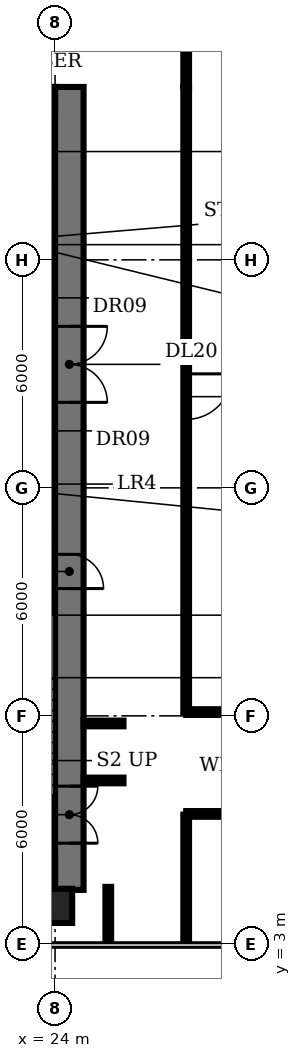
"""IFC4 building model, lengths in metres.
Left out: names, types, materials, properties, quantities, classifications, styles, units other than length and angle.
Written with IfcOpenShell. Run it as: python <this file> out.ifc"""

import sys

from ifc_helpers import new_model, si_unit, direction, frame, frame_2d, origin, origin_2d, place, context, subcontext, project, spatial, rectangle, extrude, element, fill, save


model = new_model("IFC4")
c1 = context("Model", 3, precision=1e-05, world=origin(), true_north=direction((0.0, 1.0)))
c2 = subcontext(c1, "Body", "Model", "MODEL_VIEW")
j1 = project(units=[si_unit("LENGTHUNIT", "METRE"), si_unit("PLANEANGLEUNIT", "RADIAN")], contexts=[c1])
p1 = place(None, origin())
s1 = spatial("IfcSite", under=j1, at=p1, CompositionType="ELEMENT")
p2 = place(p1, origin())
s2 = spatial("IfcBuilding", under=s1, at=p2, CompositionType="ELEMENT")
p3 = place(p2, frame((0.0, 0.0, 96.2)))
s3 = spatial("IfcBuildingStorey", under=s2, at=p3, CompositionType="ELEMENT", Elevation=96.2)
p4 = place(p3, frame((24.0, 4.0, 0.0), z_axis=(0.0, 0.0, 1.0), x_axis=(1.0, 0.0, 0.0)))
e1 = element("IfcColumn", 1, at=p4, inside=s3, PredefinedType="COLUMN", context=c2, shape_type="SweptSolid", body=[
    extrude(rectangle(XDim=0.9, YDim=0.9, at=origin_2d()), origin(), (0.0, 0.0, 1.0), 3.85),
])
p5 = place(p3, frame((20.85, 11.825, 0.0), z_axis=(0.0, 0.0, 1.0), x_axis=(1.0, 0.0, 0.0)))
e2 = element("IfcWall", 2, at=p5, inside=s3, PredefinedType="SHEAR", context=c2, shape_type="SweptSolid", body=[
    extrude(rectangle(XDim=3.15, YDim=0.25, at=frame_2d((1.575, 0.0))), origin(), (0.0, 0.0, 1.0), 3.85),
])
p6 = place(p3, frame((16.6, 13.7, 0.0), z_axis=(0.0, 0.0, 1.0), x_axis=(1.0, 0.0, 0.0)))
e3 = element("IfcWall", 3, at=p6, inside=s3, PredefinedType="PARTITIONING", context=c2, shape_type="SweptSolid", body=[
    extrude(rectangle(XDim=7.4, YDim=0.225, at=frame_2d((3.7, 0.0))), origin(), (0.0, 0.0, 1.0), 3.85),
])
p7 = place(p3, frame((9.4, 16.5, 0.0), z_axis=(0.0, 0.0, 1.0), x_axis=(1.0, 0.0, 0.0)))
e4 = element("IfcWall", 4, at=p7, inside=s3, PredefinedType="PARTITIONING", context=c2, shape_type="SweptSolid", body=[
    extrude(rectangle(XDim=14.6, YDim=0.225, at=frame_2d((7.3, 0.0))), origin(), (0.0, 0.0, 1.0), 3.85),
])
p8 = place(p7, frame((0.75, 0.0, 0.0)))
e5 = element("IfcOpeningElement", 5, at=p8, cuts=e4, PredefinedType="OPENING", context=c2, shape_type="SweptSolid", body=[
    extrude(rectangle(XDim=1.1, YDim=2.1, at=frame_2d((0.55, 1.05))), frame((0.0, 0.123, 0.0), z_axis=(0.0, -1.0, 0.0), x_axis=(1.0, 0.0, 0.0)), (0.0, 0.0, 1.0), 0.245),
])
p9 = place(p7, frame((3.55, 0.0, 0.0)))
e6 = element("IfcOpeningElement", 6, at=p9, cuts=e4, PredefinedType="OPENING", context=c2, shape_type="SweptSolid", body=[
    extrude(rectangle(XDim=1.1, YDim=2.1, at=frame_2d((0.55, 1.05))), frame((0.0, 0.123, 0.0), z_axis=(0.0, -1.0, 0.0), x_axis=(1.0, 0.0, 0.0)), (0.0, 0.0, 1.0), 0.245),
])
p10 = place(p7, frame((6.35, 0.0, 0.0)))
e7 = element("IfcOpeningElement", 7, at=p10, cuts=e4, PredefinedType="OPENING", context=c2, shape_type="SweptSolid", body=[
    extrude(rectangle(XDim=1.1, YDim=2.1, at=frame_2d((0.55, 1.05))), frame((0.0, 0.123, 0.0), z_axis=(0.0, -1.0, 0.0), x_axis=(1.0, 0.0, 0.0)), (0.0, 0.0, 1.0), 0.245),
])
p11 = place(p7, frame((9.15, 0.0, 0.0)))
e8 = element("IfcOpeningElement", 8, at=p11, cuts=e4, PredefinedType="OPENING", context=c2, shape_type="SweptSolid", body=[
    extrude(rectangle(XDim=1.1, YDim=2.1, at=frame_2d((0.55, 1.05))), frame((0.0, 0.123, 0.0), z_axis=(0.0, -1.0, 0.0), x_axis=(1.0, 0.0, 0.0)), (0.0, 0.0, 1.0), 0.245),
])
p12 = place(p7, frame((11.647, 0.0, 0.0)))
e9 = element("IfcOpeningElement", 9, at=p12, cuts=e4, PredefinedType="OPENING", context=c2, shape_type="SweptSolid", body=[
    extrude(rectangle(XDim=0.9, YDim=2.1, at=frame_2d((0.45, 1.05))), frame((0.0, 0.123, 0.0), z_axis=(0.0, -1.0, 0.0), x_axis=(1.0, 0.0, 0.0)), (0.0, 0.0, 1.0), 0.245),
])
p13 = place(p7, frame((13.423, 0.0, 0.0)))
e10 = element("IfcOpeningElement", 10, at=p13, cuts=e4, PredefinedType="OPENING", context=c2, shape_type="SweptSolid", body=[
    extrude(rectangle(XDim=0.9, YDim=2.1, at=frame_2d((0.45, 1.05))), frame((0.0, 0.123, 0.0), z_axis=(0.0, -1.0, 0.0), x_axis=(1.0, 0.0, 0.0)), (0.0, 0.0, 1.0), 0.245),
])
p14 = place(p3, frame((24.0, 20.0, 0.0), z_axis=(0.0, 0.0, 1.0), x_axis=(-1.0, 0.0, 0.0)))
e11 = element("IfcWall", 11, at=p14, inside=s3, PredefinedType="PARTITIONING", context=c2, shape_type="SweptSolid", body=[
    extrude(rectangle(XDim=14.6, YDim=0.225, at=frame_2d((7.3, 0.0))), origin(), (0.0, 0.0, 1.0), 3.85),
])
p15 = place(p14, frame((12.5, 0.0, 0.0)))
e12 = element("IfcOpeningElement", 12, at=p15, cuts=e11, PredefinedType="OPENING", context=c2, shape_type="SweptSolid", body=[
    extrude(rectangle(XDim=1.0, YDim=2.1, at=frame_2d((0.5, 1.05))), frame((0.0, 0.123, 0.0), z_axis=(0.0, -1.0, 0.0), x_axis=(1.0, 0.0, 0.0)), (0.0, 0.0, 1.0), 0.245),
])
p16 = place(p14, frame((8.825, 0.0, 0.0)))
e13 = element("IfcOpeningElement", 13, at=p16, cuts=e11, PredefinedType="OPENING", context=c2, shape_type="SweptSolid", body=[
    extrude(rectangle(XDim=1.0, YDim=2.1, at=frame_2d((0.5, 1.05))), frame((0.0, 0.123, 0.0), z_axis=(0.0, -1.0, 0.0), x_axis=(1.0, 0.0, 0.0)), (0.0, 0.0, 1.0), 0.245),
])
p17 = place(p14, frame((4.925, 0.0, 0.0)))
e14 = element("IfcOpeningElement", 14, at=p17, cuts=e11, PredefinedType="OPENING", context=c2, shape_type="SweptSolid", body=[
    extrude(rectangle(XDim=1.0, YDim=2.1, at=frame_2d((0.5, 1.05))), frame((0.0, 0.123, 0.0), z_axis=(0.0, -1.0, 0.0), x_axis=(1.0, 0.0, 0.0)), (0.0, 0.0, 1.0), 0.245),
])
p18 = place(p14, frame((2.137, 0.0, 0.0)))
e15 = element("IfcOpeningElement", 15, at=p18, cuts=e11, PredefinedType="OPENING", context=c2, shape_type="SweptSolid", body=[
    extrude(rectangle(XDim=0.9, YDim=2.1, at=frame_2d((0.45, 1.05))), frame((0.0, 0.123, 0.0), z_axis=(0.0, -1.0, 0.0), x_axis=(1.0, 0.0, 0.0)), (0.0, 0.0, 1.0), 0.245),
])
p19 = place(p14, frame((0.363, 0.0, 0.0)))
e16 = element("IfcOpeningElement", 16, at=p19, cuts=e11, PredefinedType="OPENING", context=c2, shape_type="SweptSolid", body=[
    extrude(rectangle(XDim=0.9, YDim=2.1, at=frame_2d((0.45, 1.05))), frame((0.0, 0.123, 0.0), z_axis=(0.0, -1.0, 0.0), x_axis=(1.0, 0.0, 0.0)), (0.0, 0.0, 1.0), 0.245),
])
p20 = place(p3, frame((9.4, 22.8, 0.0), z_axis=(0.0, 0.0, 1.0), x_axis=(1.0, 0.0, 0.0)))
e17 = element("IfcWall", 17, at=p20, inside=s3, PredefinedType="PARTITIONING", context=c2, shape_type="SweptSolid", body=[
    extrude(rectangle(XDim=14.6, YDim=0.225, at=frame_2d((7.3, 0.0))), origin(), (0.0, 0.0, 1.0), 3.85),
])
p21 = place(p3, frame((24.375, 25.55, 0.0), z_axis=(0.0, 0.0, 1.0), x_axis=(0.0, -1.0, 0.0)))
e18 = element("IfcWall", 18, at=p21, inside=s3, PredefinedType="SHEAR", context=c2, shape_type="SweptSolid", body=[
    extrude(rectangle(XDim=21.13, YDim=0.75, at=frame_2d((10.565, 0.0))), origin(), (0.0, 0.0, 1.0), 3.85),
])
p22 = place(p21, frame((18.4, 0.0, 0.0)))
e19 = element("IfcOpeningElement", 19, at=p22, cuts=e18, PredefinedType="OPENING", context=c2, shape_type="SweptSolid", body=[
    extrude(rectangle(XDim=1.5, YDim=2.1, at=frame_2d((0.75, 1.05))), frame((0.0, 0.385, 0.0), z_axis=(0.0, -1.0, 0.0), x_axis=(1.0, 0.0, 0.0)), (0.0, 0.0, 1.0), 0.77),
])
p23 = place(p21, frame((12.3, 0.0, 0.0)))
e20 = element("IfcOpeningElement", 20, at=p23, cuts=e18, PredefinedType="OPENING", context=c2, shape_type="SweptSolid", body=[
    extrude(rectangle(XDim=0.9, YDim=2.1, at=frame_2d((0.45, 1.05))), frame((0.0, 0.385, 0.0), z_axis=(0.0, -1.0, 0.0), x_axis=(1.0, 0.0, 0.0)), (0.0, 0.0, 1.0), 0.77),
])
p24 = place(p21, frame((6.3, 0.0, 0.0)))
e21 = element("IfcOpeningElement", 21, at=p24, cuts=e18, PredefinedType="OPENING", context=c2, shape_type="SweptSolid", body=[
    extrude(rectangle(XDim=2.0, YDim=2.1, at=frame_2d((1.0, 1.05))), frame((0.0, 0.385, 0.0), z_axis=(0.0, -1.0, 0.0), x_axis=(1.0, 0.0, 0.0)), (0.0, 0.0, 1.0), 0.77),
])
p25 = place(p3, frame((24.0, 5.025, 0.0), z_axis=(0.0, 0.0, 1.0), x_axis=(-1.0, 0.0, 0.0)))
e22 = element("IfcWall", 22, at=p25, inside=s3, PredefinedType="SHEAR", context=c2, shape_type="SweptSolid", body=[
    extrude(rectangle(XDim=18.0, YDim=0.75, at=frame_2d((9.0, 0.0))), origin(), (0.0, 0.0, 1.0), 3.85),
])
p26 = place(p25, frame((0.825, 0.0, 0.0)))
e23 = element("IfcOpeningElement", 23, at=p26, cuts=e22, PredefinedType="OPENING", context=c2, shape_type="SweptSolid", body=[
    extrude(rectangle(XDim=1.5, YDim=2.1, at=frame_2d((0.75, 1.05))), frame((0.0, 0.385, 0.0), z_axis=(0.0, -1.0, 0.0), x_axis=(1.0, 0.0, 0.0)), (0.0, 0.0, 1.0), 0.77),
])
p27 = place(p25, frame((15.675, 0.0, 0.0)))
e24 = element("IfcOpeningElement", 24, at=p27, cuts=e22, PredefinedType="OPENING", context=c2, shape_type="SweptSolid", body=[
    extrude(rectangle(XDim=1.5, YDim=2.1, at=frame_2d((0.75, 1.05))), frame((0.0, 0.385, 0.0), z_axis=(0.0, -1.0, 0.0), x_axis=(1.0, 0.0, 0.0)), (0.0, 0.0, 1.0), 0.77),
])
p28 = place(p25, frame((13.0, 0.0, 0.0)))
e25 = element("IfcOpeningElement", 25, at=p28, cuts=e22, PredefinedType="OPENING", context=c2, shape_type="SweptSolid", body=[
    extrude(rectangle(XDim=1.2, YDim=2.1, at=frame_2d((0.6, 1.05))), frame((0.0, 0.385, 0.0), z_axis=(0.0, -1.0, 0.0), x_axis=(1.0, 0.0, 0.0)), (0.0, 0.0, 1.0), 0.77),
])
p29 = place(p25, frame((4.35, 0.0, 0.0)))
e26 = element("IfcOpeningElement", 26, at=p29, cuts=e22, PredefinedType="OPENING", context=c2, shape_type="SweptSolid", body=[
    extrude(rectangle(XDim=1.0, YDim=2.1, at=frame_2d((0.5, 1.05))), frame((0.0, 0.385, 0.0), z_axis=(0.0, -1.0, 0.0), x_axis=(1.0, 0.0, 0.0)), (0.0, 0.0, 1.0), 0.77),
])
p30 = place(p3, frame((6.0, 25.175, 0.0), z_axis=(0.0, 0.0, 1.0), x_axis=(1.0, 0.0, 0.0)))
e27 = element("IfcWall", 27, at=p30, inside=s3, PredefinedType="SHEAR", context=c2, shape_type="SweptSolid", body=[
    extrude(rectangle(XDim=18.0, YDim=0.75, at=frame_2d((9.0, 0.0))), origin(), (0.0, 0.0, 1.0), 3.85),
])
for number, where, z_axis, x_axis in (
    (28, (24.75, 7.3, 0.0), (0.0, 0.0, 1.0), (1.0, 0.0, 0.0)),
    (29, (24.75, 8.8, 0.0), (0.0, 0.0, 1.0), (1.0, 0.0, 0.0)),
):
    element("IfcWall", number, at=place(p3, frame(where, z_axis=z_axis, x_axis=x_axis)), inside=s3, PredefinedType="PARTITIONING", context=c2, shape_type="SweptSolid", body=[
        extrude(rectangle(XDim=1.05, YDim=0.15, at=frame_2d((0.525, 0.0))), origin(), (0.0, 0.0, 1.0), 2.83),
    ])
p31 = place(p3, frame((25.4, 3.02, 0.0), z_axis=(0.0, 0.0, 1.0), x_axis=(0.0, 1.0, 0.0)))
e30 = element("IfcWall", 30, at=p31, inside=s3, PredefinedType="PARTITIONING", context=c2, shape_type="SweptSolid", body=[
    extrude(rectangle(XDim=1.48, YDim=0.15, at=frame_2d((0.74, 0.0))), origin(), (0.0, 0.0, 1.0), 2.83),
])
p32 = place(p3, frame((27.45, 3.02, 0.0), z_axis=(0.0, 0.0, 1.0), x_axis=(0.0, 1.0, 0.0)))
e31 = element("IfcWall", 31, at=p32, inside=s3, PredefinedType="PARTITIONING", context=c2, shape_type="SweptSolid", body=[
    extrude(rectangle(XDim=3.38, YDim=0.15, at=frame_2d((1.69, 0.0))), origin(), (0.0, 0.0, 1.0), 2.83),
])
p33 = place(p3, frame((27.45, 9.1, 0.0), z_axis=(0.0, 0.0, 1.0), x_axis=(1.0, 0.0, 0.0)))
e32 = element("IfcWall", 32, at=p33, inside=s3, PredefinedType="PARTITIONING", context=c2, shape_type="SweptSolid", body=[
    extrude(rectangle(XDim=8.55, YDim=0.15, at=frame_2d((4.275, 0.0))), origin(), (0.0, 0.0, 1.0), 2.83),
])
p34 = place(p3, frame((27.45, 25.55, 0.0), z_axis=(0.0, 0.0, 1.0), x_axis=(0.0, -1.0, 0.0)))
e33 = element("IfcWall", 33, at=p34, inside=s3, PredefinedType="PARTITIONING", context=c2, shape_type="SweptSolid", body=[
    extrude(rectangle(XDim=16.45, YDim=0.15, at=frame_2d((8.225, 0.0))), origin(), (0.0, 0.0, 1.0), 2.83),
])
p35 = place(p34, frame((7.55, 0.0, 0.0)))
e34 = element("IfcOpeningElement", 34, at=p35, cuts=e33, PredefinedType="OPENING", context=c2, shape_type="SweptSolid", body=[
    extrude(rectangle(XDim=1.2, YDim=2.1, at=frame_2d((0.6, 1.05))), frame((0.0, 0.085, 0.0), z_axis=(0.0, -1.0, 0.0), x_axis=(1.0, 0.0, 0.0)), (0.0, 0.0, 1.0), 0.17),
])
p36 = place(p3, frame((27.45, 25.55, 0.0), z_axis=(0.0, 0.0, 1.0), x_axis=(0.0, 1.0, 0.0)))
e35 = element("IfcWall", 35, at=p36, inside=s3, PredefinedType="PARTITIONING", context=c2, shape_type="SweptSolid", body=[
    extrude(rectangle(XDim=3.9, YDim=0.15, at=frame_2d((1.95, 0.0))), origin(), (0.0, 0.0, 1.0), 2.83),
])
p37 = place(p3, frame((51.78, 6.419, 0.0), z_axis=(0.0, 0.0, 1.0), x_axis=(-1.0, 0.0, 0.0)))
e36 = element("IfcWall", 36, at=p37, inside=s3, PredefinedType="PARTITIONING", context=c2, shape_type="SweptSolid", body=[
    extrude(rectangle(XDim=24.33, YDim=0.15, at=frame_2d((12.165, 0.0))), origin(), (0.0, 0.0, 1.0), 2.83),
])
p38 = place(p37, frame((11.53, 0.0, 0.0)))
e37 = element("IfcOpeningElement", 37, at=p38, cuts=e36, PredefinedType="OPENING", context=c2, shape_type="SweptSolid", body=[
    extrude(rectangle(XDim=1.2, YDim=2.1, at=frame_2d((0.6, 1.05))), frame((0.0, 0.085, 0.0), z_axis=(0.0, -1.0, 0.0), x_axis=(1.0, 0.0, 0.0)), (0.0, 0.0, 1.0), 0.17),
])
p39 = place(p22, origin())
e38 = element("IfcDoor", 38, at=p39, inside=s3, OperationType="DOUBLE_DOOR_SINGLE_SWING", PredefinedType="DOOR", context=c2, shape_type="SweptSolid", body=[
    extrude(rectangle(XDim=1.5, YDim=2.1, at=frame_2d((0.75, 1.05))), frame((0.0, 0.025, 0.0), z_axis=(0.0, -1.0, 0.0), x_axis=(1.0, 0.0, 0.0)), (0.0, 0.0, 1.0), 0.05),
])
fill(e19, e38)
p40 = place(p23, origin())
e39 = element("IfcDoor", 39, at=p40, inside=s3, OperationType="SINGLE_SWING_RIGHT", PredefinedType="DOOR", context=c2, shape_type="SweptSolid", body=[
    extrude(rectangle(XDim=0.9, YDim=2.1, at=frame_2d((0.45, 1.05))), frame((0.0, -0.315, 0.0), z_axis=(0.0, -1.0, 0.0), x_axis=(1.0, 0.0, 0.0)), (0.0, 0.0, 1.0), 0.05),
])
fill(e20, e39)
p41 = place(p24, origin())
e40 = element("IfcDoor", 40, at=p41, inside=s3, OperationType="DOUBLE_DOOR_SINGLE_SWING", PredefinedType="DOOR", context=c2, shape_type="SweptSolid", body=[
    extrude(rectangle(XDim=2.0, YDim=2.1, at=frame_2d((1.0, 1.05))), frame((0.0, 0.025, 0.0), z_axis=(0.0, -1.0, 0.0), x_axis=(1.0, 0.0, 0.0)), (0.0, 0.0, 1.0), 0.05),
])
fill(e21, e40)
p42 = place(p35, origin())
e41 = element("IfcDoor", 41, at=p42, inside=s3, OperationType="SINGLE_SWING_LEFT", PredefinedType="DOOR", context=c2, shape_type="SweptSolid", body=[
    extrude(rectangle(XDim=1.2, YDim=2.1, at=frame_2d((0.6, 1.05))), frame((0.0, 0.025, 0.0), z_axis=(0.0, -1.0, 0.0), x_axis=(1.0, 0.0, 0.0)), (0.0, 0.0, 1.0), 0.05),
])
fill(e34, e41)
save(model, sys.argv[1])
